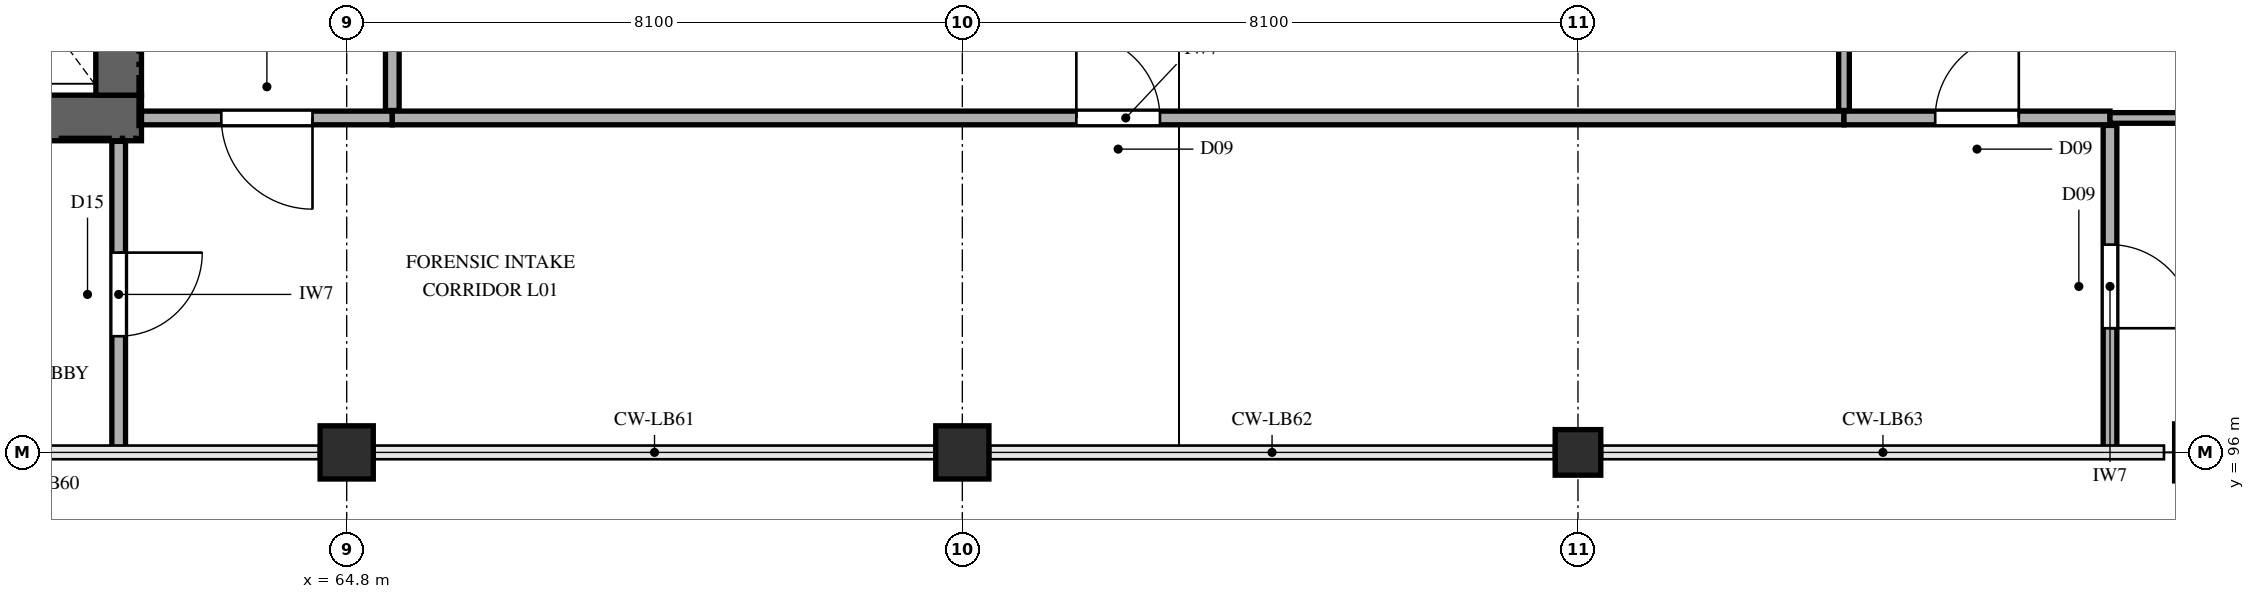
"""IFC4 building model, lengths in metres.
Left out: names, types, materials, properties, quantities, classifications, styles, units other than length and angle.
Written with IfcOpenShell. Run it as: python <this file> out.ifc"""

import sys

from ifc_helpers import new_model, si_unit, direction, frame, frame_2d, origin, origin_2d, place, context, subcontext, project, spatial, rectangle, extrude, element, fill, save


model = new_model("IFC4")
c1 = context("Model", 3, precision=1e-05, world=origin(), true_north=direction((0.0, 1.0)))
c2 = subcontext(c1, "Body", "Model", "MODEL_VIEW")
j1 = project(units=[si_unit("LENGTHUNIT", "METRE"), si_unit("PLANEANGLEUNIT", "RADIAN")], contexts=[c1])
p1 = place(None, origin())
s1 = spatial("IfcSite", under=j1, at=p1, CompositionType="ELEMENT")
p2 = place(p1, origin())
s2 = spatial("IfcBuilding", under=s1, at=p2, CompositionType="ELEMENT")
p3 = place(p2, frame((0.0, 0.0, 5.4)))
s3 = spatial("IfcBuildingStorey", under=s2, at=p3, CompositionType="ELEMENT", Elevation=5.4)
p4 = place(p3, frame((46.7, 100.4, 0.0), z_axis=(0.0, 0.0, 1.0), x_axis=(1.0, 0.0, 0.0)))
e1 = element("IfcWall", 1, at=p4, inside=s3, PredefinedType="SHEAR", context=c2, shape_type="SweptSolid", body=[
    extrude(rectangle(XDim=15.4, YDim=0.6, at=frame_2d((7.7, 0.0))), origin(), (0.0, 0.0, 1.0), 4.8),
])
p5 = place(p4, frame((1.05, 0.0, 0.0)))
e2 = element("IfcOpeningElement", 2, at=p5, cuts=e1, PredefinedType="OPENING", context=c2, shape_type="SweptSolid", body=[
    extrude(rectangle(XDim=1.15, YDim=2.25, at=frame_2d((0.575, 1.125))), frame((0.0, 0.31, 0.0), z_axis=(0.0, -1.0, 0.0), x_axis=(1.0, 0.0, 0.0)), (0.0, 0.0, 1.0), 0.62),
])
p6 = place(p4, frame((10.333, 0.0, 0.0)))
e3 = element("IfcOpeningElement", 3, at=p6, cuts=e1, PredefinedType="OPENING", context=c2, shape_type="SweptSolid", body=[
    extrude(rectangle(XDim=1.1, YDim=2.2, at=frame_2d((0.55, 1.1))), frame((0.0, 0.31, 0.0), z_axis=(0.0, -1.0, 0.0), x_axis=(1.0, 0.0, 0.0)), (0.0, 0.0, 1.0), 0.62),
])
p7 = place(p4, frame((13.048, 0.0, 0.0)))
e4 = element("IfcOpeningElement", 4, at=p7, cuts=e1, PredefinedType="OPENING", context=c2, shape_type="SweptSolid", body=[
    extrude(rectangle(XDim=1.1, YDim=2.2, at=frame_2d((0.55, 1.1))), frame((0.0, 0.31, 0.0), z_axis=(0.0, -1.0, 0.0), x_axis=(1.0, 0.0, 0.0)), (0.0, 0.0, 1.0), 0.62),
])
p8 = place(p3, frame((61.8, 100.7, 0.0), z_axis=(0.0, 0.0, 1.0), x_axis=(0.0, 1.0, 0.0)))
e5 = element("IfcWall", 5, at=p8, inside=s3, PredefinedType="SHEAR", context=c2, shape_type="SweptSolid", body=[
    extrude(rectangle(XDim=7.8, YDim=0.6, at=frame_2d((3.9, 0.0))), origin(), (0.0, 0.0, 1.0), 4.8),
])
for number, where, z_axis, x_axis in (
    (6, (64.8, 96.0, 0.0), (0.0, 0.0, 1.0), (1.0, 0.0, 0.0)),
    (7, (72.9, 96.0, 0.0), (0.0, 0.0, 1.0), (1.0, 0.0, 0.0)),
):
    element("IfcColumn", number, at=place(p3, frame(where, z_axis=z_axis, x_axis=x_axis)), inside=s3, PredefinedType="COLUMN", context=c2, shape_type="SweptSolid", body=[
        extrude(rectangle(XDim=0.7, YDim=0.7, at=origin_2d()), origin(), (0.0, 0.0, 1.0), 4.8),
    ])
p9 = place(p3, frame((81.0, 96.0, 0.0), z_axis=(0.0, 0.0, 1.0), x_axis=(1.0, 0.0, 0.0)))
e8 = element("IfcColumn", 8, at=p9, inside=s3, PredefinedType="COLUMN", context=c2, shape_type="SweptSolid", body=[
    extrude(rectangle(XDim=0.6, YDim=0.6, at=origin_2d()), origin(), (0.0, 0.0, 1.0), 4.8),
])
p10 = place(p3, frame((89.1, 96.0, 0.0), z_axis=(0.0, 0.0, 1.0), x_axis=(1.0, 0.0, 0.0)))
e9 = element("IfcColumn", 9, at=p10, inside=s3, PredefinedType="COLUMN", context=c2, shape_type="SweptSolid", body=[
    extrude(rectangle(XDim=0.5, YDim=0.75, at=origin_2d()), origin(), (0.0, 0.0, 1.0), 4.8),
])
p11 = place(p3, frame((62.1, 100.4, 0.0), z_axis=(0.0, 0.0, 1.0), x_axis=(1.0, 0.0, 0.0)))
e10 = element("IfcWall", 10, at=p11, inside=s3, PredefinedType="PARTITIONING", context=c2, shape_type="SweptSolid", body=[
    extrude(rectangle(XDim=3.3, YDim=0.18, at=frame_2d((1.65, 0.0))), origin(), (0.0, 0.0, 1.0), 4.52),
])
p12 = place(p11, frame((1.05, 0.0, 0.0)))
e11 = element("IfcOpeningElement", 11, at=p12, cuts=e10, PredefinedType="OPENING", context=c2, shape_type="SweptSolid", body=[
    extrude(rectangle(XDim=1.2, YDim=2.2, at=frame_2d((0.6, 1.1))), frame((0.0, 0.1, 0.0), z_axis=(0.0, -1.0, 0.0), x_axis=(1.0, 0.0, 0.0)), (0.0, 0.0, 1.0), 0.2),
])
p13 = place(p3, frame((65.4, 100.4, 0.0), z_axis=(0.0, 0.0, 1.0), x_axis=(1.0, 0.0, 0.0)))
e12 = element("IfcWall", 12, at=p13, inside=s3, PredefinedType="PARTITIONING", context=c2, shape_type="SweptSolid", body=[
    extrude(rectangle(XDim=19.1, YDim=0.18, at=frame_2d((9.55, 0.0))), origin(), (0.0, 0.0, 1.0), 4.52),
])
p14 = place(p13, frame((9.0, 0.0, 0.0)))
e13 = element("IfcOpeningElement", 13, at=p14, cuts=e12, PredefinedType="OPENING", context=c2, shape_type="SweptSolid", body=[
    extrude(rectangle(XDim=1.1, YDim=2.3, at=frame_2d((0.55, 1.15))), frame((0.0, 0.1, 0.0), z_axis=(0.0, -1.0, 0.0), x_axis=(1.0, 0.0, 0.0)), (0.0, 0.0, 1.0), 0.2),
])
p15 = place(p3, frame((84.5, 100.4, 0.0), z_axis=(0.0, 0.0, 1.0), x_axis=(1.0, 0.0, 0.0)))
e14 = element("IfcWall", 14, at=p15, inside=s3, PredefinedType="PARTITIONING", context=c2, shape_type="SweptSolid", body=[
    extrude(rectangle(XDim=3.5, YDim=0.18, at=frame_2d((1.75, 0.0))), origin(), (0.0, 0.0, 1.0), 4.52),
])
p16 = place(p15, frame((1.2, 0.0, 0.0)))
e15 = element("IfcOpeningElement", 15, at=p16, cuts=e14, PredefinedType="OPENING", context=c2, shape_type="SweptSolid", body=[
    extrude(rectangle(XDim=1.1, YDim=2.3, at=frame_2d((0.55, 1.15))), frame((0.0, 0.1, 0.0), z_axis=(0.0, -1.0, 0.0), x_axis=(1.0, 0.0, 0.0)), (0.0, 0.0, 1.0), 0.2),
])
p17 = place(p3, frame((88.0, 100.4, 0.0), z_axis=(0.0, 0.0, 1.0), x_axis=(1.0, 0.0, 0.0)))
e16 = element("IfcWall", 16, at=p17, inside=s3, PredefinedType="PARTITIONING", context=c2, shape_type="SweptSolid", body=[
    extrude(rectangle(XDim=5.706, YDim=0.14, at=frame_2d((2.853, 0.0))), origin(), (0.0, 0.0, 1.0), 4.52),
])
p18 = place(p3, frame((61.8, 96.065, 0.0), z_axis=(0.0, 0.0, 1.0), x_axis=(0.0, 1.0, 0.0)))
e17 = element("IfcWall", 17, at=p18, inside=s3, PredefinedType="PARTITIONING", context=c2, shape_type="SweptSolid", body=[
    extrude(rectangle(XDim=4.027, YDim=0.18, at=frame_2d((2.014, 0.0))), origin(), (0.0, 0.0, 1.0), 4.52),
])
p19 = place(p18, frame((1.463, 0.0, 0.0)))
e18 = element("IfcOpeningElement", 18, at=p19, cuts=e17, PredefinedType="OPENING", context=c2, shape_type="SweptSolid", body=[
    extrude(rectangle(XDim=1.1, YDim=2.2, at=frame_2d((0.55, 1.1))), frame((0.0, 0.1, 0.0), z_axis=(0.0, -1.0, 0.0), x_axis=(1.0, 0.0, 0.0)), (0.0, 0.0, 1.0), 0.2),
])
p20 = place(p3, frame((65.4, 100.498, 0.0), z_axis=(0.0, 0.0, 1.0), x_axis=(0.0, 1.0, 0.0)))
e19 = element("IfcWall", 19, at=p20, inside=s3, PredefinedType="PARTITIONING", context=c2, shape_type="SweptSolid", body=[
    extrude(rectangle(XDim=5.672, YDim=0.18, at=frame_2d((2.836, 0.0))), origin(), (0.0, 0.0, 1.0), 4.52),
])
p21 = place(p3, frame((84.5, 100.498, 0.0), z_axis=(0.0, 0.0, 1.0), x_axis=(0.0, 1.0, 0.0)))
e20 = element("IfcWall", 20, at=p21, inside=s3, PredefinedType="PARTITIONING", context=c2, shape_type="SweptSolid", body=[
    extrude(rectangle(XDim=5.672, YDim=0.14, at=frame_2d((2.836, 0.0))), origin(), (0.0, 0.0, 1.0), 4.52),
])
p22 = place(p3, frame((88.0, 96.065, 0.0), z_axis=(0.0, 0.0, 1.0), x_axis=(0.0, 1.0, 0.0)))
e21 = element("IfcWall", 21, at=p22, inside=s3, PredefinedType="PARTITIONING", context=c2, shape_type="SweptSolid", body=[
    extrude(rectangle(XDim=4.237, YDim=0.18, at=frame_2d((2.119, 0.0))), origin(), (0.0, 0.0, 1.0), 4.52),
])
p23 = place(p22, frame((1.569, 0.0, 0.0)))
e22 = element("IfcOpeningElement", 22, at=p23, cuts=e21, PredefinedType="OPENING", context=c2, shape_type="SweptSolid", body=[
    extrude(rectangle(XDim=1.1, YDim=2.3, at=frame_2d((0.55, 1.15))), frame((0.0, 0.1, 0.0), z_axis=(0.0, -1.0, 0.0), x_axis=(1.0, 0.0, 0.0)), (0.0, 0.0, 1.0), 0.2),
])
p24 = place(p12, frame((1.2, 0.0, 0.0), z_axis=(0.0, 0.0, 1.0), x_axis=(-1.0, 0.0, 0.0)))
e23 = element("IfcDoor", 23, at=p24, inside=s3, OperationType="SINGLE_SWING_RIGHT", PredefinedType="DOOR", context=c2, shape_type="SweptSolid", body=[
    extrude(rectangle(XDim=1.2, YDim=2.2, at=frame_2d((0.6, 1.1))), frame((0.0, 0.025, 0.0), z_axis=(0.0, -1.0, 0.0), x_axis=(1.0, 0.0, 0.0)), (0.0, 0.0, 1.0), 0.05),
])
fill(e11, e23)
p25 = place(p14, origin())
e24 = element("IfcDoor", 24, at=p25, inside=s3, OperationType="SINGLE_SWING_LEFT", PredefinedType="DOOR", context=c2, shape_type="SweptSolid", body=[
    extrude(rectangle(XDim=1.1, YDim=2.3, at=frame_2d((0.55, 1.15))), frame((0.0, 0.025, 0.0), z_axis=(0.0, -1.0, 0.0), x_axis=(1.0, 0.0, 0.0)), (0.0, 0.0, 1.0), 0.05),
])
fill(e13, e24)
p26 = place(p16, origin())
e25 = element("IfcDoor", 25, at=p26, inside=s3, OperationType="SINGLE_SWING_RIGHT", PredefinedType="DOOR", context=c2, shape_type="SweptSolid", body=[
    extrude(rectangle(XDim=1.1, YDim=2.3, at=frame_2d((0.55, 1.15))), frame((0.0, 0.025, 0.0), z_axis=(0.0, -1.0, 0.0), x_axis=(1.0, 0.0, 0.0)), (0.0, 0.0, 1.0), 0.05),
])
fill(e15, e25)
p27 = place(p19, frame((1.1, 0.0, 0.0), z_axis=(0.0, 0.0, 1.0), x_axis=(-1.0, 0.0, 0.0)))
e26 = element("IfcDoor", 26, at=p27, inside=s3, OperationType="SINGLE_SWING_RIGHT", PredefinedType="DOOR", context=c2, shape_type="SweptSolid", body=[
    extrude(rectangle(XDim=1.1, YDim=2.2, at=frame_2d((0.55, 1.1))), frame((0.0, 0.025, 0.0), z_axis=(0.0, -1.0, 0.0), x_axis=(1.0, 0.0, 0.0)), (0.0, 0.0, 1.0), 0.05),
])
fill(e18, e26)
p28 = place(p23, frame((1.1, 0.0, 0.0), z_axis=(0.0, 0.0, 1.0), x_axis=(-1.0, 0.0, 0.0)))
e27 = element("IfcDoor", 27, at=p28, inside=s3, OperationType="SINGLE_SWING_LEFT", PredefinedType="DOOR", context=c2, shape_type="SweptSolid", body=[
    extrude(rectangle(XDim=1.1, YDim=2.3, at=frame_2d((0.55, 1.15))), frame((0.0, 0.025, 0.0), z_axis=(0.0, -1.0, 0.0), x_axis=(1.0, 0.0, 0.0)), (0.0, 0.0, 1.0), 0.05),
])
fill(e22, e27)
save(model, sys.argv[1])
